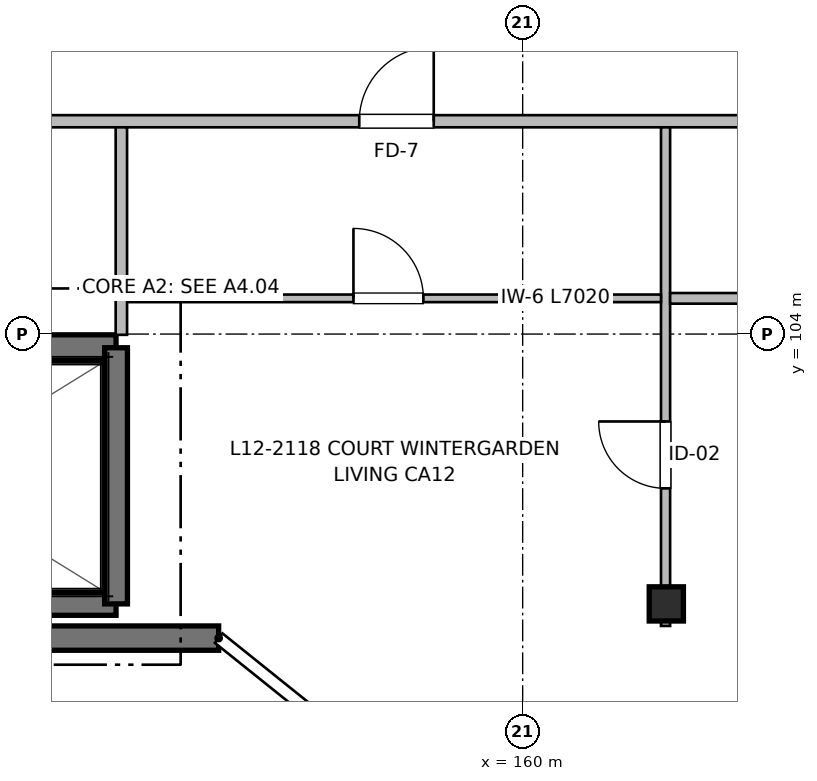
"""IFC4 building model, lengths in metres.
Left out: names, types, materials, properties, quantities, classifications, styles, units other than length and angle.
Written with IfcOpenShell. Run it as: python <this file> out.ifc"""

import sys

from ifc_helpers import new_model, si_unit, direction, frame, frame_2d, origin, origin_2d, place, context, subcontext, project, spatial, rectangle, extrude, element, fill, save


model = new_model("IFC4")
c1 = context("Model", 3, precision=1e-05, world=origin(), true_north=direction((0.0, 1.0)))
c2 = subcontext(c1, "Body", "Model", "MODEL_VIEW")
j1 = project(units=[si_unit("LENGTHUNIT", "METRE"), si_unit("PLANEANGLEUNIT", "RADIAN")], contexts=[c1])
p1 = place(None, origin())
s1 = spatial("IfcSite", under=j1, at=p1, CompositionType="ELEMENT")
p2 = place(p1, origin())
s2 = spatial("IfcBuilding", under=s1, at=p2, CompositionType="ELEMENT")
p3 = place(p2, frame((0.0, 0.0, 39.36)))
s3 = spatial("IfcBuildingStorey", under=s2, at=p3, CompositionType="ELEMENT", Elevation=39.36)
p4 = place(p3, frame((161.89, 100.45, 0.0), z_axis=(0.0, 0.0, 1.0), x_axis=(1.0, 0.0, 0.0)))
e1 = element("IfcColumn", 1, at=p4, inside=s3, PredefinedType="COLUMN", context=c2, shape_type="SweptSolid", body=[
    extrude(rectangle(XDim=0.45, YDim=0.45, at=origin_2d()), origin(), (0.0, 0.0, 1.0), 3.2),
])
p5 = place(p3, frame((147.75, 100.45, 0.0), z_axis=(0.0, 0.0, 1.0), x_axis=(1.0, 0.0, 0.0)))
e2 = element("IfcWall", 2, at=p5, inside=s3, PredefinedType="SHEAR", context=c2, shape_type="SweptSolid", body=[
    extrude(rectangle(XDim=6.9, YDim=0.3, at=frame_2d((3.45, 0.0))), origin(), (0.0, 0.0, 1.0), 3.2),
])
p6 = place(p3, frame((154.65, 103.82, 0.0), z_axis=(0.0, 0.0, 1.0), x_axis=(-1.0, 0.0, 0.0)))
e3 = element("IfcWall", 3, at=p6, inside=s3, PredefinedType="SHEAR", context=c2, shape_type="SweptSolid", body=[
    extrude(rectangle(XDim=6.9, YDim=0.34, at=frame_2d((3.45, 0.0))), origin(), (0.0, 0.0, 1.0), 3.2),
])
p7 = place(p6, frame((5.25, 0.0, 0.0)))
e4 = element("IfcOpeningElement", 4, at=p7, cuts=e3, PredefinedType="OPENING", context=c2, shape_type="SweptSolid", body=[
    extrude(rectangle(XDim=1.05, YDim=2.15, at=frame_2d((0.525, 1.075))), frame((0.0, 0.18, 0.0), z_axis=(0.0, -1.0, 0.0), x_axis=(1.0, 0.0, 0.0)), (0.0, 0.0, 1.0), 0.36),
])
p8 = place(p3, frame((154.65, 100.45, 0.0), z_axis=(0.0, 0.0, 1.0), x_axis=(0.0, 1.0, 0.0)))
e5 = element("IfcWall", 5, at=p8, inside=s3, PredefinedType="SHEAR", context=c2, shape_type="SweptSolid", body=[
    extrude(rectangle(XDim=3.37, YDim=0.3, at=frame_2d((1.685, 0.0))), origin(), (0.0, 0.0, 1.0), 3.2),
])
p9 = place(p3, frame((156.0, 100.0, 0.0), z_axis=(0.0, 0.0, 1.0), x_axis=(-1.0, 0.0, 0.0)))
e6 = element("IfcWall", 6, at=p9, inside=s3, PredefinedType="SHEAR", context=c2, shape_type="SweptSolid", body=[
    extrude(rectangle(XDim=9.0, YDim=0.32, at=frame_2d((4.5, 0.0))), origin(), (0.0, 0.0, 1.0), 2.98),
])
p10 = place(p9, frame((3.15, 0.0, 0.47)))
e7 = element("IfcOpeningElement", 7, at=p10, cuts=e6, PredefinedType="OPENING", context=c2, shape_type="SweptSolid", body=[
    extrude(rectangle(XDim=2.7, YDim=1.75, at=frame_2d((1.35, 0.875))), frame((0.0, 0.17, 0.0), z_axis=(0.0, -1.0, 0.0), x_axis=(1.0, 0.0, 0.0)), (0.0, 0.0, 1.0), 0.34),
])
p11 = place(p3, frame((147.16, 106.8, 0.0), z_axis=(0.0, 0.0, 1.0), x_axis=(1.0, 0.0, 0.0)))
e8 = element("IfcWall", 8, at=p11, inside=s3, PredefinedType="PARTITIONING", context=c2, shape_type="SweptSolid", body=[
    extrude(rectangle(XDim=27.64, YDim=0.16, at=frame_2d((13.82, 0.0))), origin(), (0.0, 0.0, 1.0), 2.935),
])
p12 = place(p11, frame((3.515, 0.0, 0.0)))
e9 = element("IfcOpeningElement", 9, at=p12, cuts=e8, PredefinedType="OPENING", context=c2, shape_type="SweptSolid", body=[
    extrude(rectangle(XDim=1.05, YDim=2.15, at=frame_2d((0.525, 1.075))), frame((0.0, 0.09, 0.0), z_axis=(0.0, -1.0, 0.0), x_axis=(1.0, 0.0, 0.0)), (0.0, 0.0, 1.0), 0.18),
])
p13 = place(p11, frame((10.69, 0.0, 0.0)))
e10 = element("IfcOpeningElement", 10, at=p13, cuts=e8, PredefinedType="OPENING", context=c2, shape_type="SweptSolid", body=[
    extrude(rectangle(XDim=0.98, YDim=2.15, at=frame_2d((0.49, 1.075))), frame((0.0, 0.09, 0.0), z_axis=(0.0, -1.0, 0.0), x_axis=(1.0, 0.0, 0.0)), (0.0, 0.0, 1.0), 0.18),
])
p14 = place(p3, frame((154.72, 103.99, 0.0), z_axis=(0.0, 0.0, 1.0), x_axis=(0.0, 1.0, 0.0)))
e11 = element("IfcWall", 11, at=p14, inside=s3, PredefinedType="PARTITIONING", context=c2, shape_type="SweptSolid", body=[
    extrude(rectangle(XDim=2.73, YDim=0.15, at=frame_2d((1.365, 0.0))), origin(), (0.0, 0.0, 1.0), 2.935),
])
p15 = place(p3, frame((161.88, 100.16, 0.0), z_axis=(0.0, 0.0, 1.0), x_axis=(0.0, 1.0, 0.0)))
e12 = element("IfcWall", 12, at=p15, inside=s3, PredefinedType="PARTITIONING", context=c2, shape_type="SweptSolid", body=[
    extrude(rectangle(XDim=6.56, YDim=0.12, at=frame_2d((3.28, 0.0))), origin(), (0.0, 0.0, 1.0), 2.68),
])
p16 = place(p15, frame((1.81, 0.0, 0.0)))
e13 = element("IfcOpeningElement", 13, at=p16, cuts=e12, PredefinedType="OPENING", context=c2, shape_type="SweptSolid", body=[
    extrude(rectangle(XDim=0.88, YDim=2.1, at=frame_2d((0.44, 1.05))), frame((0.0, 0.07, 0.0), z_axis=(0.0, -1.0, 0.0), x_axis=(1.0, 0.0, 0.0)), (0.0, 0.0, 1.0), 0.14),
])
p17 = place(p3, frame((161.94, 104.47, 0.0), z_axis=(0.0, 0.0, 1.0), x_axis=(1.0, 0.0, 0.0)))
e14 = element("IfcWall", 14, at=p17, inside=s3, PredefinedType="PARTITIONING", context=c2, shape_type="SweptSolid", body=[
    extrude(rectangle(XDim=5.97, YDim=0.14, at=frame_2d((2.985, 0.0))), origin(), (0.0, 0.0, 1.0), 2.935),
])
p18 = place(p17, frame((2.533, 0.0, 0.0)))
e15 = element("IfcOpeningElement", 15, at=p18, cuts=e14, PredefinedType="OPENING", context=c2, shape_type="SweptSolid", body=[
    extrude(rectangle(XDim=0.86, YDim=2.1, at=frame_2d((0.43, 1.05))), frame((0.0, 0.08, 0.0), z_axis=(0.0, -1.0, 0.0), x_axis=(1.0, 0.0, 0.0)), (0.0, 0.0, 1.0), 0.16),
])
p19 = place(p3, frame((154.8, 104.47, 0.0), z_axis=(0.0, 0.0, 1.0), x_axis=(1.0, 0.0, 0.0)))
e16 = element("IfcWall", 16, at=p19, inside=s3, PredefinedType="PARTITIONING", context=c2, shape_type="SweptSolid", body=[
    extrude(rectangle(XDim=7.02, YDim=0.1, at=frame_2d((3.51, 0.0))), origin(), (0.0, 0.0, 1.0), 2.935),
])
p20 = place(p19, frame((2.974, 0.0, 0.0)))
e17 = element("IfcOpeningElement", 17, at=p20, cuts=e16, PredefinedType="OPENING", context=c2, shape_type="SweptSolid", body=[
    extrude(rectangle(XDim=0.92, YDim=2.1, at=frame_2d((0.46, 1.05))), frame((0.0, 0.06, 0.0), z_axis=(0.0, -1.0, 0.0), x_axis=(1.0, 0.0, 0.0)), (0.0, 0.0, 1.0), 0.12),
])
p21 = place(p13, origin())
e18 = element("IfcDoor", 18, at=p21, inside=s3, OperationType="SINGLE_SWING_RIGHT", PredefinedType="DOOR", context=c2, shape_type="SweptSolid", body=[
    extrude(rectangle(XDim=0.98, YDim=2.15, at=frame_2d((0.49, 1.075))), frame((0.0, 0.025, 0.0), z_axis=(0.0, -1.0, 0.0), x_axis=(1.0, 0.0, 0.0)), (0.0, 0.0, 1.0), 0.05),
])
fill(e10, e18)
p22 = place(p20, origin())
e19 = element("IfcDoor", 19, at=p22, inside=s3, OperationType="SINGLE_SWING_LEFT", PredefinedType="DOOR", context=c2, shape_type="SweptSolid", body=[
    extrude(rectangle(XDim=0.92, YDim=2.1, at=frame_2d((0.46, 1.05))), frame((0.0, 0.025, 0.0), z_axis=(0.0, -1.0, 0.0), x_axis=(1.0, 0.0, 0.0)), (0.0, 0.0, 1.0), 0.05),
])
fill(e17, e19)
p23 = place(p16, origin())
e20 = element("IfcDoor", 20, at=p23, inside=s3, OperationType="SINGLE_SWING_RIGHT", PredefinedType="DOOR", context=c2, shape_type="SweptSolid", body=[
    extrude(rectangle(XDim=0.88, YDim=2.1, at=frame_2d((0.44, 1.05))), frame((0.0, 0.025, 0.0), z_axis=(0.0, -1.0, 0.0), x_axis=(1.0, 0.0, 0.0)), (0.0, 0.0, 1.0), 0.05),
])
fill(e13, e20)
save(model, sys.argv[1])
